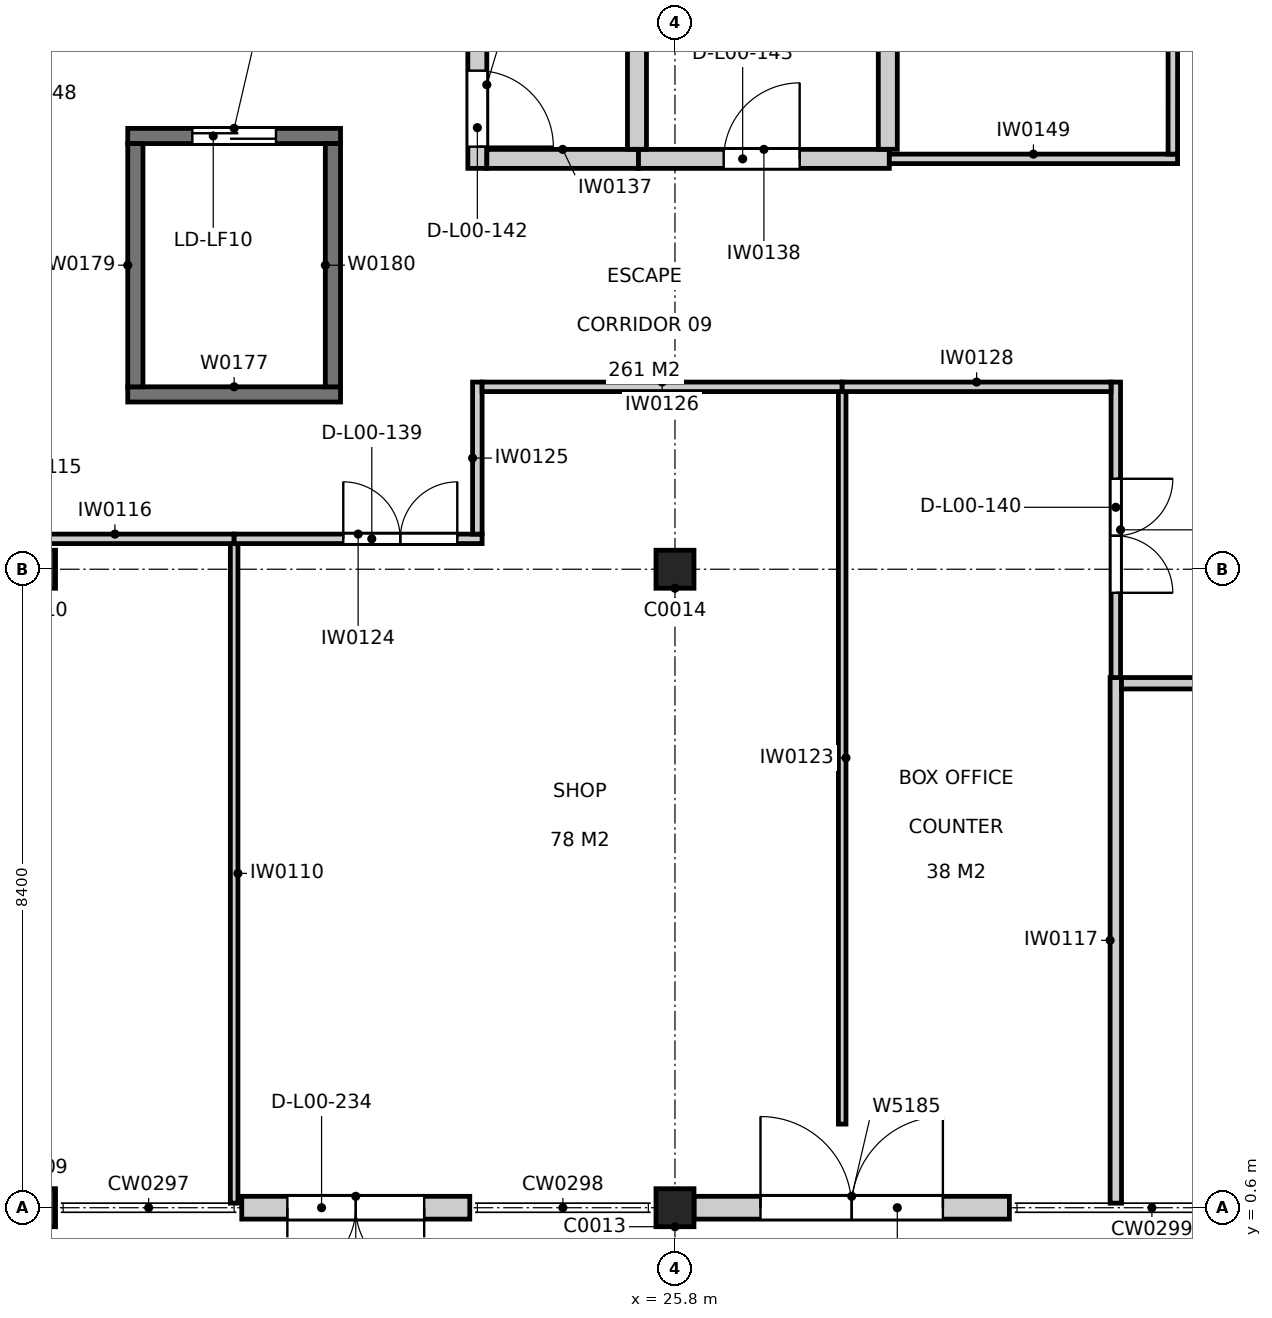
"""IFC4 building model, lengths in metres.
Left out: names, types, materials, properties, quantities, classifications, styles, units other than length and angle.
Written with IfcOpenShell. Run it as: python <this file> out.ifc"""

import sys

from ifc_helpers import new_model, si_unit, direction, frame, frame_2d, origin, origin_2d, place, context, subcontext, project, spatial, rectangle, extrude, element, fill, save


model = new_model("IFC4")
c1 = context("Model", 3, precision=1e-05, world=origin(), true_north=direction((0.0, 1.0)))
c2 = subcontext(c1, "Body", "Model", "MODEL_VIEW")
j1 = project(units=[si_unit("LENGTHUNIT", "METRE"), si_unit("PLANEANGLEUNIT", "RADIAN")], contexts=[c1])
p1 = place(None, origin())
s1 = spatial("IfcSite", under=j1, at=p1, CompositionType="ELEMENT")
p2 = place(p1, origin())
s2 = spatial("IfcBuilding", under=s1, at=p2, CompositionType="ELEMENT")
p3 = place(p2, origin())
s3 = spatial("IfcBuildingStorey", under=s2, at=p3, CompositionType="ELEMENT", Elevation=0.0)
for number, where, z_axis, x_axis in (
    (1, (17.4, 0.6, 0.0), (0.0, 0.0, 1.0), (1.0, 0.0, 0.0)),
    (2, (17.4, 9.0, 0.0), (0.0, 0.0, 1.0), (1.0, 0.0, 0.0)),
    (3, (25.8, 0.6, 0.0), (0.0, 0.0, 1.0), (1.0, 0.0, 0.0)),
    (4, (25.8, 9.0, 0.0), (0.0, 0.0, 1.0), (1.0, 0.0, 0.0)),
):
    element("IfcColumn", number, at=place(p3, frame(where, z_axis=z_axis, x_axis=x_axis)), inside=s3, PredefinedType="COLUMN", context=c2, shape_type="SweptSolid", body=[
        extrude(rectangle(XDim=0.5, YDim=0.5, at=origin_2d()), origin(), (0.0, 0.0, 1.0), 4.8),
    ])
p4 = place(p3, frame((18.6, 11.3, 0.0), z_axis=(0.0, 0.0, 1.0), x_axis=(1.0, 0.0, 0.0)))
e5 = element("IfcWall", 5, at=p4, inside=s3, PredefinedType="SOLIDWALL", context=c2, shape_type="SweptSolid", body=[
    extrude(rectangle(XDim=2.8, YDim=0.2, at=frame_2d((1.4, 0.0))), origin(), (0.0, 0.0, 1.0), 4.8),
])
p5 = place(p3, frame((18.6, 14.7, 0.0), z_axis=(0.0, 0.0, 1.0), x_axis=(1.0, 0.0, 0.0)))
e6 = element("IfcWall", 6, at=p5, inside=s3, PredefinedType="SOLIDWALL", context=c2, shape_type="SweptSolid", body=[
    extrude(rectangle(XDim=2.8, YDim=0.2, at=frame_2d((1.4, 0.0))), origin(), (0.0, 0.0, 1.0), 4.8),
])
p6 = place(p5, frame((0.85, 0.0, 0.0)))
e7 = element("IfcOpeningElement", 7, at=p6, cuts=e6, PredefinedType="OPENING", context=c2, shape_type="SweptSolid", body=[
    extrude(rectangle(XDim=1.1, YDim=2.1, at=frame_2d((0.55, 1.05))), frame((0.0, 0.11, 0.0), z_axis=(0.0, -1.0, 0.0), x_axis=(1.0, 0.0, 0.0)), (0.0, 0.0, 1.0), 0.22),
])
for number, where, z_axis, x_axis in (
    (8, (18.7, 11.4, 0.0), (0.0, 0.0, 1.0), (0.0, 1.0, 0.0)),
    (9, (21.3, 11.4, 0.0), (0.0, 0.0, 1.0), (0.0, 1.0, 0.0)),
):
    element("IfcWall", number, at=place(p3, frame(where, z_axis=z_axis, x_axis=x_axis)), inside=s3, PredefinedType="SOLIDWALL", context=c2, shape_type="SweptSolid", body=[
        extrude(rectangle(XDim=3.2, YDim=0.2, at=frame_2d((1.6, 0.0))), origin(), (0.0, 0.0, 1.0), 4.8),
    ])
p7 = place(p3, frame((20.0, 9.337, 0.0), z_axis=(0.0, 0.0, 1.0), x_axis=(0.0, -1.0, 0.0)))
e10 = element("IfcWall", 10, at=p7, inside=s3, PredefinedType="PARTITIONING", context=c2, shape_type="SweptSolid", body=[
    extrude(rectangle(XDim=8.677, YDim=0.1, at=frame_2d((4.339, 0.0))), origin(), (0.0, 0.0, 1.0), 3.84),
])
p8 = place(p3, frame((16.863, 9.4, 0.0), z_axis=(0.0, 0.0, 1.0), x_axis=(1.0, 0.0, 0.0)))
e11 = element("IfcWall", 11, at=p8, inside=s3, PredefinedType="PARTITIONING", context=c2, shape_type="SweptSolid", body=[
    extrude(rectangle(XDim=3.137, YDim=0.125, at=frame_2d((1.569, 0.0))), origin(), (0.0, 0.0, 1.0), 3.84),
])
p9 = place(p3, frame((31.6, 0.66, 0.0), z_axis=(0.0, 0.0, 1.0), x_axis=(0.0, 1.0, 0.0)))
e12 = element("IfcWall", 12, at=p9, inside=s3, PredefinedType="PARTITIONING", context=c2, shape_type="SweptSolid", body=[
    extrude(rectangle(XDim=6.915, YDim=0.15, at=frame_2d((3.458, 0.0))), origin(), (0.0, 0.0, 1.0), 4.04),
])
p10 = place(p3, frame((31.675, 7.5, 0.0), z_axis=(0.0, 0.0, 1.0), x_axis=(1.0, 0.0, 0.0)))
e13 = element("IfcWall", 13, at=p10, inside=s3, PredefinedType="PARTITIONING", context=c2, shape_type="SweptSolid", body=[
    extrude(rectangle(XDim=8.05, YDim=0.15, at=frame_2d((4.025, 0.0))), origin(), (0.0, 0.0, 1.0), 3.84),
])
p11 = place(p3, frame((28.0, 11.337, 0.0), z_axis=(0.0, 0.0, 1.0), x_axis=(0.0, -1.0, 0.0)))
e14 = element("IfcWall", 14, at=p11, inside=s3, PredefinedType="PARTITIONING", context=c2, shape_type="SweptSolid", body=[
    extrude(rectangle(XDim=9.637, YDim=0.1, at=frame_2d((4.819, 0.0))), origin(), (0.0, 0.0, 1.0), 3.84),
])
p12 = place(p3, frame((20.0, 9.4, 0.0), z_axis=(0.0, 0.0, 1.0), x_axis=(1.0, 0.0, 0.0)))
e15 = element("IfcWall", 15, at=p12, inside=s3, PredefinedType="PARTITIONING", context=c2, shape_type="SweptSolid", body=[
    extrude(rectangle(XDim=3.262, YDim=0.125, at=frame_2d((1.631, 0.0))), origin(), (0.0, 0.0, 1.0), 4.64),
])
p13 = place(p12, frame((1.436, 0.0, 0.0)))
e16 = element("IfcOpeningElement", 16, at=p13, cuts=e15, PredefinedType="OPENING", context=c2, shape_type="SweptSolid", body=[
    extrude(rectangle(XDim=1.5, YDim=2.1, at=frame_2d((0.75, 1.05))), frame((0.0, 0.073, 0.0), z_axis=(0.0, -1.0, 0.0), x_axis=(1.0, 0.0, 0.0)), (0.0, 0.0, 1.0), 0.145),
])
p14 = place(p3, frame((23.2, 9.462, 0.0), z_axis=(0.0, 0.0, 1.0), x_axis=(0.0, 1.0, 0.0)))
e17 = element("IfcWall", 17, at=p14, inside=s3, PredefinedType="PARTITIONING", context=c2, shape_type="SweptSolid", body=[
    extrude(rectangle(XDim=2.0, YDim=0.125, at=frame_2d((1.0, 0.0))), origin(), (0.0, 0.0, 1.0), 4.64),
])
p15 = place(p3, frame((23.262, 11.4, 0.0), z_axis=(0.0, 0.0, 1.0), x_axis=(1.0, 0.0, 0.0)))
e18 = element("IfcWall", 18, at=p15, inside=s3, PredefinedType="PARTITIONING", context=c2, shape_type="SweptSolid", body=[
    extrude(rectangle(XDim=4.738, YDim=0.125, at=frame_2d((2.369, 0.0))), origin(), (0.0, 0.0, 1.0), 3.84),
])
p16 = place(p3, frame((31.6, 11.462, 0.0), z_axis=(0.0, 0.0, 1.0), x_axis=(0.0, -1.0, 0.0)))
e19 = element("IfcWall", 19, at=p16, inside=s3, PredefinedType="PARTITIONING", context=c2, shape_type="SweptSolid", body=[
    extrude(rectangle(XDim=3.887, YDim=0.125, at=frame_2d((1.944, 0.0))), origin(), (0.0, 0.0, 1.0), 3.84),
])
p17 = place(p16, frame((1.272, 0.0, 0.0)))
e20 = element("IfcOpeningElement", 20, at=p17, cuts=e19, PredefinedType="OPENING", context=c2, shape_type="SweptSolid", body=[
    extrude(rectangle(XDim=1.5, YDim=2.1, at=frame_2d((0.75, 1.05))), frame((0.0, 0.073, 0.0), z_axis=(0.0, -1.0, 0.0), x_axis=(1.0, 0.0, 0.0)), (0.0, 0.0, 1.0), 0.145),
])
p18 = place(p3, frame((28.0, 11.4, 0.0), z_axis=(0.0, 0.0, 1.0), x_axis=(1.0, 0.0, 0.0)))
e21 = element("IfcWall", 21, at=p18, inside=s3, PredefinedType="PARTITIONING", context=c2, shape_type="SweptSolid", body=[
    extrude(rectangle(XDim=3.538, YDim=0.125, at=frame_2d((1.769, 0.0))), origin(), (0.0, 0.0, 1.0), 4.64),
])
p19 = place(p3, frame((23.199, 16.474, 0.0), z_axis=(0.0, 0.0, 1.0), x_axis=(0.000443852597, -0.999999901497, 0.0)))
e22 = element("IfcWall", 22, at=p19, inside=s3, PredefinedType="PARTITIONING", context=c2, shape_type="SweptSolid", body=[
    extrude(rectangle(XDim=2.2, YDim=0.25, at=frame_2d((1.1, 0.0))), origin(), (0.0, 0.0, 1.0), 4.04),
])
p20 = place(p19, frame((0.915, 0.0, 0.0)))
e23 = element("IfcOpeningElement", 23, at=p20, cuts=e22, PredefinedType="OPENING", context=c2, shape_type="SweptSolid", body=[
    extrude(rectangle(XDim=1.0, YDim=2.1, at=frame_2d((0.5, 1.05))), frame((0.0, 0.135, 0.0), z_axis=(0.0, -1.0, 0.0), x_axis=(1.0, 0.0, 0.0)), (0.0, 0.0, 1.0), 0.27),
])
p21 = place(p3, frame((23.325, 14.399, 0.0), z_axis=(0.0, 0.0, 1.0), x_axis=(1.0, 0.0, 0.0)))
e24 = element("IfcWall", 24, at=p21, inside=s3, PredefinedType="PARTITIONING", context=c2, shape_type="SweptSolid", body=[
    extrude(rectangle(XDim=1.995, YDim=0.25, at=frame_2d((0.998, 0.0))), origin(), (0.0, 0.0, 1.0), 4.04),
])
p22 = place(p3, frame((25.32, 14.399, 0.0), z_axis=(0.0, 0.0, 1.0), x_axis=(1.0, 0.0, 0.0)))
e25 = element("IfcWall", 25, at=p22, inside=s3, PredefinedType="PARTITIONING", context=c2, shape_type="SweptSolid", body=[
    extrude(rectangle(XDim=3.3, YDim=0.25, at=frame_2d((1.65, 0.0))), origin(), (0.0, 0.0, 1.0), 3.84),
])
p23 = place(p22, frame((1.121, 0.0, 0.0)))
e26 = element("IfcOpeningElement", 26, at=p23, cuts=e25, PredefinedType="OPENING", context=c2, shape_type="SweptSolid", body=[
    extrude(rectangle(XDim=1.0, YDim=2.1, at=frame_2d((0.5, 1.05))), frame((0.0, 0.135, 0.0), z_axis=(0.0, -1.0, 0.0), x_axis=(1.0, 0.0, 0.0)), (0.0, 0.0, 1.0), 0.27),
])
p24 = place(p3, frame((28.62, 14.399, 0.0), z_axis=(0.0, 0.0, 1.0), x_axis=(1.0, 0.0, 0.0)))
e27 = element("IfcWall", 27, at=p24, inside=s3, PredefinedType="PARTITIONING", context=c2, shape_type="SweptSolid", body=[
    extrude(rectangle(XDim=3.792, YDim=0.125, at=frame_2d((1.896, 0.0))), origin(), (0.0, 0.0, 1.0), 4.04),
])
p25 = place(p3, frame((32.35, 14.461, 0.0), z_axis=(0.0, 0.0, 1.0), x_axis=(0.000238180296, 0.999999971635, 0.0)))
e28 = element("IfcWall", 28, at=p25, inside=s3, PredefinedType="PARTITIONING", context=c2, shape_type="SweptSolid", body=[
    extrude(rectangle(XDim=4.1, YDim=0.125, at=frame_2d((2.05, 0.0))), origin(), (0.0, 0.0, 1.0), 3.84),
])
p26 = place(p25, frame((1.54, 0.0, 0.0)))
e29 = element("IfcOpeningElement", 29, at=p26, cuts=e28, PredefinedType="OPENING", context=c2, shape_type="SweptSolid", body=[
    extrude(rectangle(XDim=1.0, YDim=2.1, at=frame_2d((0.5, 1.05))), frame((0.0, 0.073, 0.0), z_axis=(0.0, -1.0, 0.0), x_axis=(1.0, 0.0, 0.0)), (0.0, 0.0, 1.0), 0.145),
])
for number, where, z_axis, x_axis in (
    (30, (25.3, 25.6, 0.0), (0.0, 0.0, 1.0), (0.0, -1.0, 0.0)),
    (31, (28.6, 25.6, 0.0), (0.0, 0.0, 1.0), (0.0, -1.0, 0.0)),
):
    element("IfcWall", number, at=place(p3, frame(where, z_axis=z_axis, x_axis=x_axis)), inside=s3, PredefinedType="PARTITIONING", context=c2, shape_type="SweptSolid", body=[
        extrude(rectangle(XDim=11.075, YDim=0.25, at=frame_2d((5.538, 0.0))), origin(), (0.0, 0.0, 1.0), 3.84),
    ])
p27 = place(p3, frame((26.05, 0.6, 0.0), z_axis=(0.0, 0.0, 1.0), x_axis=(1.0, 0.0, 0.0)))
e32 = element("IfcWall", 32, at=p27, inside=s3, PredefinedType="SOLIDWALL", context=c2, shape_type="SweptSolid", body=[
    extrude(rectangle(XDim=4.15, YDim=0.3, at=frame_2d((2.075, 0.0))), origin(), (0.0, 0.0, 1.0), 3.84),
])
p28 = place(p27, frame((0.875, 0.0, 0.0)))
e33 = element("IfcOpeningElement", 33, at=p28, cuts=e32, PredefinedType="OPENING", context=c2, shape_type="SweptSolid", body=[
    extrude(rectangle(XDim=2.4, YDim=2.4, at=frame_2d((1.2, 1.2))), frame((0.0, 0.16, 0.0), z_axis=(0.0, -1.0, 0.0), x_axis=(1.0, 0.0, 0.0)), (0.0, 0.0, 1.0), 0.32),
])
p29 = place(p3, frame((20.1, 0.6, 0.0), z_axis=(0.0, 0.0, 1.0), x_axis=(1.0, 0.0, 0.0)))
e34 = element("IfcWall", 34, at=p29, inside=s3, PredefinedType="SOLIDWALL", context=c2, shape_type="SweptSolid", body=[
    extrude(rectangle(XDim=3.0, YDim=0.3, at=frame_2d((1.5, 0.0))), origin(), (0.0, 0.0, 1.0), 3.84),
])
p30 = place(p29, frame((2.4, 0.0, 0.0), z_axis=(0.0, 0.0, 1.0), x_axis=(-1.0, 0.0, 0.0)))
e35 = element("IfcOpeningElement", 35, at=p30, cuts=e34, PredefinedType="OPENING", context=c2, shape_type="SweptSolid", body=[
    extrude(rectangle(XDim=1.8, YDim=2.1, at=frame_2d((0.9, 1.05))), frame((0.0, 0.16, 0.0), z_axis=(0.0, -1.0, 0.0), x_axis=(1.0, 0.0, 0.0)), (0.0, 0.0, 1.0), 0.32),
])
p31 = place(p13, origin())
e36 = element("IfcDoor", 36, at=p31, inside=s3, OperationType="DOUBLE_DOOR_SINGLE_SWING", PredefinedType="DOOR", context=c2, shape_type="SweptSolid", body=[
    extrude(rectangle(XDim=1.5, YDim=2.1, at=frame_2d((0.75, 1.05))), frame((0.0, 0.025, 0.0), z_axis=(0.0, -1.0, 0.0), x_axis=(1.0, 0.0, 0.0)), (0.0, 0.0, 1.0), 0.05),
])
fill(e16, e36)
p32 = place(p17, origin())
e37 = element("IfcDoor", 37, at=p32, inside=s3, OperationType="DOUBLE_DOOR_SINGLE_SWING", PredefinedType="DOOR", context=c2, shape_type="SweptSolid", body=[
    extrude(rectangle(XDim=1.5, YDim=2.1, at=frame_2d((0.75, 1.05))), frame((0.0, 0.025, 0.0), z_axis=(0.0, -1.0, 0.0), x_axis=(1.0, 0.0, 0.0)), (0.0, 0.0, 1.0), 0.05),
])
fill(e20, e37)
p33 = place(p20, origin())
e38 = element("IfcDoor", 38, at=p33, inside=s3, OperationType="SINGLE_SWING_RIGHT", PredefinedType="DOOR", context=c2, shape_type="SweptSolid", body=[
    extrude(rectangle(XDim=1.0, YDim=2.1, at=frame_2d((0.5, 1.05))), frame((0.0, 0.025, 0.0), z_axis=(0.0, -1.0, 0.0), x_axis=(1.0, 0.0, 0.0)), (0.0, 0.0, 1.0), 0.05),
])
fill(e23, e38)
p34 = place(p23, origin())
e39 = element("IfcDoor", 39, at=p34, inside=s3, OperationType="SINGLE_SWING_RIGHT", PredefinedType="DOOR", context=c2, shape_type="SweptSolid", body=[
    extrude(rectangle(XDim=1.0, YDim=2.1, at=frame_2d((0.5, 1.05))), frame((0.0, 0.025, 0.0), z_axis=(0.0, -1.0, 0.0), x_axis=(1.0, 0.0, 0.0)), (0.0, 0.0, 1.0), 0.05),
])
fill(e26, e39)
p35 = place(p28, origin())
e40 = element("IfcDoor", 40, at=p35, inside=s3, OperationType="DOUBLE_DOOR_SINGLE_SWING", PredefinedType="DOOR", context=c2, shape_type="SweptSolid", body=[
    extrude(rectangle(XDim=2.4, YDim=2.4, at=frame_2d((1.2, 1.2))), frame((0.0, 0.025, 0.0), z_axis=(0.0, -1.0, 0.0), x_axis=(1.0, 0.0, 0.0)), (0.0, 0.0, 1.0), 0.05),
])
fill(e33, e40)
p36 = place(p30, origin())
e41 = element("IfcDoor", 41, at=p36, inside=s3, OperationType="DOUBLE_DOOR_SINGLE_SWING", PredefinedType="DOOR", context=c2, shape_type="SweptSolid", body=[
    extrude(rectangle(XDim=1.8, YDim=2.1, at=frame_2d((0.9, 1.05))), frame((0.0, 0.025, 0.0), z_axis=(0.0, -1.0, 0.0), x_axis=(1.0, 0.0, 0.0)), (0.0, 0.0, 1.0), 0.05),
])
fill(e35, e41)
p37 = place(p6, origin())
e42 = element("IfcDoor", 42, at=p37, inside=s3, OperationType="SLIDING_TO_LEFT", PredefinedType="DOOR", context=c2, shape_type="SweptSolid", body=[
    extrude(rectangle(XDim=1.1, YDim=2.1, at=frame_2d((0.55, 1.05))), frame((0.0, 0.025, 0.0), z_axis=(0.0, -1.0, 0.0), x_axis=(1.0, 0.0, 0.0)), (0.0, 0.0, 1.0), 0.05),
])
fill(e7, e42)
save(model, sys.argv[1])
